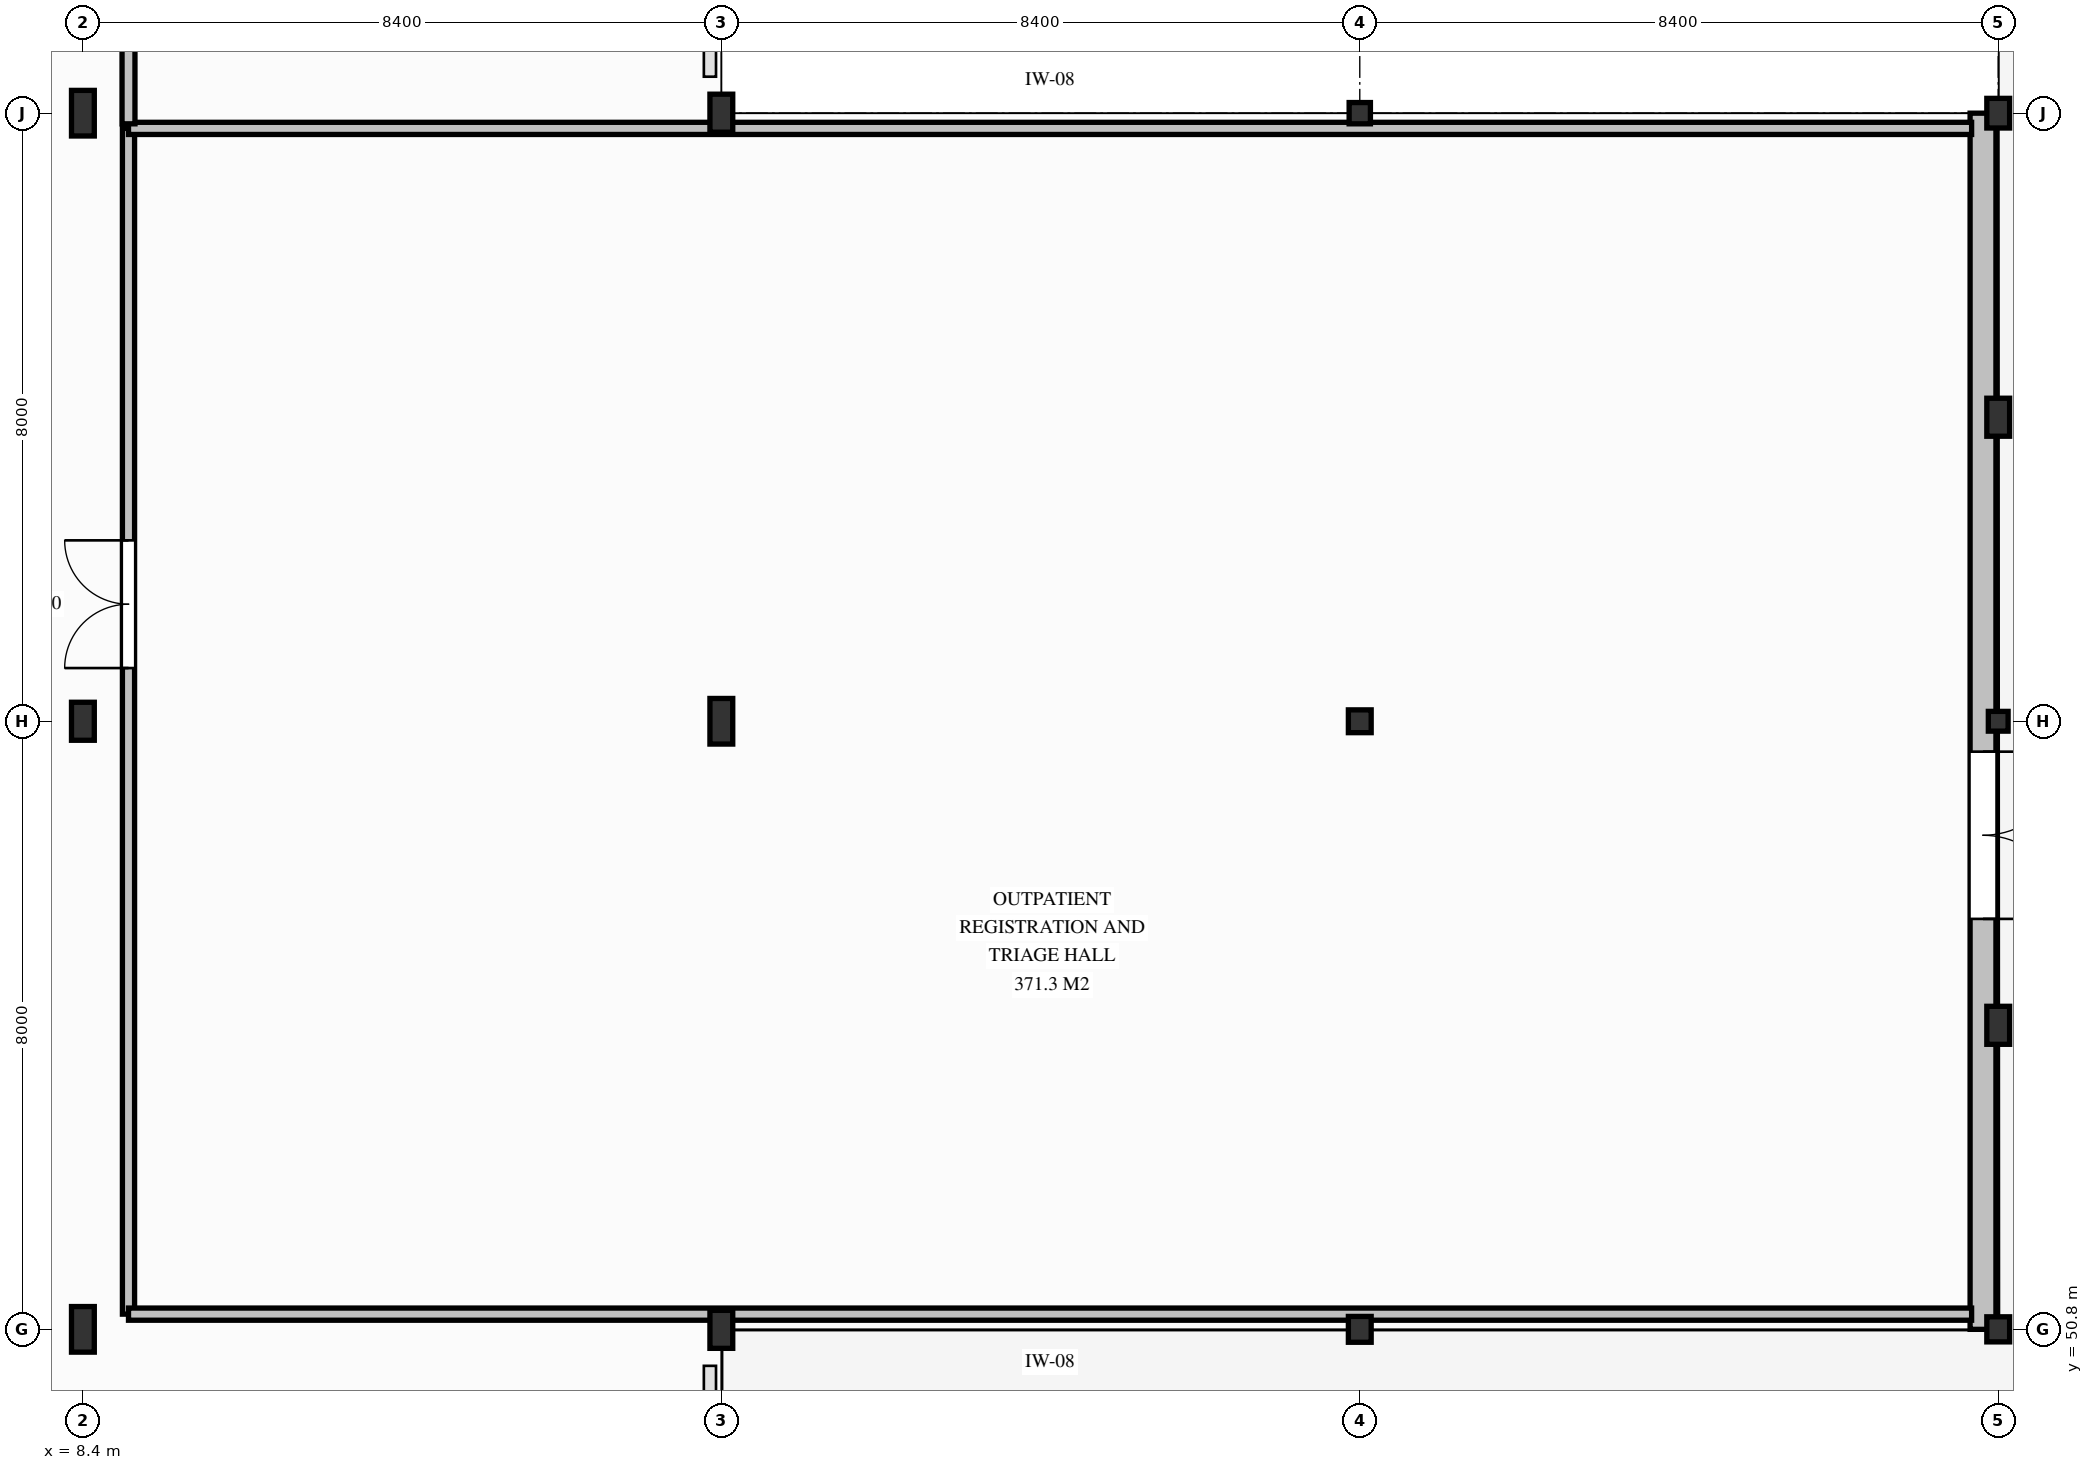
"""IFC4 building model, lengths in metres.
Left out: names, types, materials, properties, quantities, classifications, styles, units other than length and angle.
Written with IfcOpenShell. Run it as: python <this file> out.ifc"""

import sys

from ifc_helpers import new_model, si_unit, direction, frame, frame_2d, origin, origin_2d, place, context, subcontext, project, spatial, rectangle, i_section, extrude, element, fill, save


model = new_model("IFC4")
c1 = context("Model", 3, precision=1e-05, world=origin(), true_north=direction((0.0, 1.0)))
c2 = subcontext(c1, "Body", "Model", "MODEL_VIEW")
j1 = project(units=[si_unit("LENGTHUNIT", "METRE"), si_unit("PLANEANGLEUNIT", "RADIAN")], contexts=[c1])
p1 = place(None, origin())
s1 = spatial("IfcSite", under=j1, at=p1, CompositionType="ELEMENT")
p2 = place(p1, origin())
s2 = spatial("IfcBuilding", under=s1, at=p2, CompositionType="ELEMENT")
p3 = place(p2, origin())
s3 = spatial("IfcBuildingStorey", under=s2, at=p3, CompositionType="ELEMENT", Elevation=0.0)
p4 = place(p3, frame((8.4, 50.8, 0.0), z_axis=(0.0, 0.0, 1.0), x_axis=(1.0, 0.0, 0.0)))
e1 = element("IfcColumn", 1, at=p4, inside=s3, PredefinedType="COLUMN", context=c2, shape_type="SweptSolid", body=[
    extrude(i_section(OverallWidth=0.3, OverallDepth=0.6, WebThickness=0.015, FlangeThickness=0.03, FilletRadius=0.027, at=origin_2d()), origin(), (0.0, 0.0, 1.0), 4.5),
])
p5 = place(p3, frame((8.4, 58.8, 0.0), z_axis=(0.0, 0.0, 1.0), x_axis=(1.0, 0.0, 0.0)))
e2 = element("IfcColumn", 2, at=p5, inside=s3, PredefinedType="COLUMN", context=c2, shape_type="SweptSolid", body=[
    extrude(i_section(OverallWidth=0.3, OverallDepth=0.5, WebThickness=0.014, FlangeThickness=0.028, FilletRadius=0.027, at=origin_2d()), origin(), (0.0, 0.0, 1.0), 4.5),
])
p6 = place(p3, frame((8.4, 66.8, 0.0), z_axis=(0.0, 0.0, 1.0), x_axis=(1.0, 0.0, 0.0)))
e3 = element("IfcColumn", 3, at=p6, inside=s3, PredefinedType="COLUMN", context=c2, shape_type="SweptSolid", body=[
    extrude(i_section(OverallWidth=0.3, OverallDepth=0.6, WebThickness=0.015, FlangeThickness=0.03, FilletRadius=0.027, at=origin_2d()), origin(), (0.0, 0.0, 1.0), 4.5),
])
p7 = place(p3, frame((16.8, 50.8, 0.0), z_axis=(0.0, 0.0, 1.0), x_axis=(1.0, 0.0, 0.0)))
e4 = element("IfcColumn", 4, at=p7, inside=s3, PredefinedType="COLUMN", context=c2, shape_type="SweptSolid", body=[
    extrude(i_section(OverallWidth=0.3, OverallDepth=0.5, WebThickness=0.014, FlangeThickness=0.028, FilletRadius=0.027, at=origin_2d()), origin(), (0.0, 0.0, 1.0), 4.5),
])
p8 = place(p3, frame((16.8, 58.8, 0.0), z_axis=(0.0, 0.0, 1.0), x_axis=(1.0, 0.0, 0.0)))
e5 = element("IfcColumn", 5, at=p8, inside=s3, PredefinedType="COLUMN", context=c2, shape_type="SweptSolid", body=[
    extrude(i_section(OverallWidth=0.3, OverallDepth=0.6, WebThickness=0.015, FlangeThickness=0.03, FilletRadius=0.027, at=origin_2d()), origin(), (0.0, 0.0, 1.0), 4.5),
])
p9 = place(p3, frame((16.8, 66.8, 0.0), z_axis=(0.0, 0.0, 1.0), x_axis=(1.0, 0.0, 0.0)))
e6 = element("IfcColumn", 6, at=p9, inside=s3, PredefinedType="COLUMN", context=c2, shape_type="SweptSolid", body=[
    extrude(i_section(OverallWidth=0.3, OverallDepth=0.5, WebThickness=0.014, FlangeThickness=0.028, FilletRadius=0.027, at=origin_2d()), origin(), (0.0, 0.0, 1.0), 4.5),
])
p10 = place(p3, frame((25.2, 50.8, 0.0), z_axis=(0.0, 0.0, 1.0), x_axis=(1.0, 0.0, 0.0)))
e7 = element("IfcColumn", 7, at=p10, inside=s3, PredefinedType="COLUMN", context=c2, shape_type="SweptSolid", body=[
    extrude(i_section(OverallWidth=0.3, OverallDepth=0.34, WebThickness=0.012, FlangeThickness=0.021, FilletRadius=0.027, at=origin_2d()), origin(), (0.0, 0.0, 1.0), 4.5),
])
p11 = place(p3, frame((25.2, 58.8, 0.0), z_axis=(0.0, 0.0, 1.0), x_axis=(1.0, 0.0, 0.0)))
e8 = element("IfcColumn", 8, at=p11, inside=s3, PredefinedType="COLUMN", context=c2, shape_type="SweptSolid", body=[
    extrude(i_section(OverallWidth=0.3, OverallDepth=0.3, WebThickness=0.011, FlangeThickness=0.019, FilletRadius=0.027, at=origin_2d()), origin(), (0.0, 0.0, 1.0), 4.5),
])
p12 = place(p3, frame((25.2, 66.8, 0.0), z_axis=(0.0, 0.0, 1.0), x_axis=(1.0, 0.0, 0.0)))
e9 = element("IfcColumn", 9, at=p12, inside=s3, PredefinedType="COLUMN", context=c2, shape_type="SweptSolid", body=[
    extrude(i_section(OverallWidth=0.28, OverallDepth=0.28, WebThickness=0.01, FlangeThickness=0.018, FilletRadius=0.024, at=origin_2d()), origin(), (0.0, 0.0, 1.0), 4.5),
])
p13 = place(p3, frame((33.6, 50.8, 0.0), z_axis=(0.0, 0.0, 1.0), x_axis=(1.0, 0.0, 0.0)))
e10 = element("IfcColumn", 10, at=p13, inside=s3, PredefinedType="COLUMN", context=c2, shape_type="SweptSolid", body=[
    extrude(i_section(OverallWidth=0.3, OverallDepth=0.33, WebThickness=0.01, FlangeThickness=0.017, FilletRadius=0.027, at=origin_2d()), origin(), (0.0, 0.0, 1.0), 4.5),
])
p14 = place(p3, frame((33.6, 54.8, 0.0), z_axis=(0.0, 0.0, 1.0), x_axis=(1.0, 0.0, 0.0)))
e11 = element("IfcColumn", 11, at=p14, inside=s3, PredefinedType="COLUMN", context=c2, shape_type="SweptSolid", body=[
    extrude(i_section(OverallWidth=0.3, OverallDepth=0.5, WebThickness=0.014, FlangeThickness=0.028, FilletRadius=0.027, at=origin_2d()), origin(), (0.0, 0.0, 1.0), 4.5),
])
p15 = place(p3, frame((33.6, 58.8, 0.0), z_axis=(0.0, 0.0, 1.0), x_axis=(1.0, 0.0, 0.0)))
e12 = element("IfcColumn", 12, at=p15, inside=s3, PredefinedType="COLUMN", context=c2, shape_type="SweptSolid", body=[
    extrude(i_section(OverallWidth=0.26, OverallDepth=0.26, WebThickness=0.01, FlangeThickness=0.018, FilletRadius=0.024, at=origin_2d()), origin(), (0.0, 0.0, 1.0), 4.5),
])
p16 = place(p3, frame((33.6, 62.8, 0.0), z_axis=(0.0, 0.0, 1.0), x_axis=(1.0, 0.0, 0.0)))
e13 = element("IfcColumn", 13, at=p16, inside=s3, PredefinedType="COLUMN", context=c2, shape_type="SweptSolid", body=[
    extrude(i_section(OverallWidth=0.3, OverallDepth=0.5, WebThickness=0.014, FlangeThickness=0.028, FilletRadius=0.027, at=origin_2d()), origin(), (0.0, 0.0, 1.0), 4.5),
])
p17 = place(p3, frame((33.6, 66.8, 0.0), z_axis=(0.0, 0.0, 1.0), x_axis=(1.0, 0.0, 0.0)))
e14 = element("IfcColumn", 14, at=p17, inside=s3, PredefinedType="COLUMN", context=c2, shape_type="SweptSolid", body=[
    extrude(i_section(OverallWidth=0.3, OverallDepth=0.39, WebThickness=0.011, FlangeThickness=0.019, FilletRadius=0.027, at=origin_2d()), origin(), (0.0, 0.0, 1.0), 4.5),
])
p18 = place(p3, frame((33.4, 66.8, 0.0), z_axis=(0.0, 0.0, 1.0), x_axis=(0.0, -1.0, 0.0)))
e15 = element("IfcWall", 15, at=p18, inside=s3, PredefinedType="SOLIDWALL", context=c2, shape_type="SweptSolid", body=[
    extrude(rectangle(XDim=16.0, YDim=0.34, at=frame_2d((8.0, 0.0))), origin(), (0.0, 0.0, 1.0), 2.828),
])
p19 = place(p18, frame((8.4, 0.0, 0.0)))
e16 = element("IfcOpeningElement", 16, at=p19, cuts=e15, PredefinedType="OPENING", context=c2, shape_type="SweptSolid", body=[
    extrude(rectangle(XDim=2.2, YDim=2.5, at=frame_2d((1.1, 1.25))), frame((0.0, 0.18, 0.0), z_axis=(0.0, -1.0, 0.0), x_axis=(1.0, 0.0, 0.0)), (0.0, 0.0, 1.0), 0.36),
])
p20 = place(p3, frame((9.0, 51.0, 0.0), z_axis=(0.0, 0.0, 1.0), x_axis=(0.0, 1.0, 0.0)))
e17 = element("IfcWall", 17, at=p20, inside=s3, PredefinedType="PARTITIONING", context=c2, shape_type="SweptSolid", body=[
    extrude(rectangle(XDim=15.6, YDim=0.16, at=frame_2d((7.8, 0.0))), origin(), (0.0, 0.0, 1.0), 3.778),
])
p21 = place(p20, frame((8.5, 0.0, 0.0)))
e18 = element("IfcOpeningElement", 18, at=p21, cuts=e17, PredefinedType="OPENING", context=c2, shape_type="SweptSolid", body=[
    extrude(rectangle(XDim=1.68, YDim=2.26, at=frame_2d((0.84, 1.13))), frame((0.0, 0.09, 0.0), z_axis=(0.0, -1.0, 0.0), x_axis=(1.0, 0.0, 0.0)), (0.0, 0.0, 1.0), 0.18),
])
p22 = place(p3, frame((9.0, 66.6, 0.0), z_axis=(0.0, 0.0, 1.0), x_axis=(1.0, 0.0, 0.0)))
e19 = element("IfcWall", 19, at=p22, inside=s3, PredefinedType="PARTITIONING", context=c2, shape_type="SweptSolid", body=[
    extrude(rectangle(XDim=24.25, YDim=0.16, at=frame_2d((12.125, 0.0))), origin(), (0.0, 0.0, 1.0), 3.628),
])
p23 = place(p3, frame((33.25, 51.0, 0.0), z_axis=(0.0, 0.0, 1.0), x_axis=(-1.0, 0.0, 0.0)))
e20 = element("IfcWall", 20, at=p23, inside=s3, PredefinedType="PARTITIONING", context=c2, shape_type="SweptSolid", body=[
    extrude(rectangle(XDim=24.25, YDim=0.16, at=frame_2d((12.125, 0.0))), origin(), (0.0, 0.0, 1.0), 3.678),
])
p24 = place(p3, frame((9.0, 94.6, 0.0), z_axis=(0.0, 0.0, 1.0), x_axis=(0.0, -1.0, 0.0)))
e21 = element("IfcWall", 21, at=p24, inside=s3, PredefinedType="PARTITIONING", context=c2, shape_type="SweptSolid", body=[
    extrude(rectangle(XDim=27.94, YDim=0.17, at=frame_2d((13.97, 0.0))), origin(), (0.0, 0.0, 1.0), 3.788),
])
p25 = place(p24, frame((13.05, 0.0, 0.0)))
e22 = element("IfcOpeningElement", 22, at=p25, cuts=e21, PredefinedType="OPENING", context=c2, shape_type="SweptSolid", body=[
    extrude(rectangle(XDim=1.06, YDim=2.16, at=frame_2d((0.53, 1.08))), frame((0.0, 0.095, 0.0), z_axis=(0.0, -1.0, 0.0), x_axis=(1.0, 0.0, 0.0)), (0.0, 0.0, 1.0), 0.19),
])
p26 = place(p19, origin())
e23 = element("IfcDoor", 23, at=p26, inside=s3, OperationType="DOUBLE_DOOR_SINGLE_SWING", PredefinedType="DOOR", context=c2, shape_type="SweptSolid", body=[
    extrude(rectangle(XDim=2.2, YDim=2.5, at=frame_2d((1.1, 1.25))), frame((0.0, 0.025, 0.0), z_axis=(0.0, -1.0, 0.0), x_axis=(1.0, 0.0, 0.0)), (0.0, 0.0, 1.0), 0.05),
])
fill(e16, e23)
p27 = place(p21, origin())
e24 = element("IfcDoor", 24, at=p27, inside=s3, OperationType="DOUBLE_DOOR_SINGLE_SWING", PredefinedType="DOOR", context=c2, shape_type="SweptSolid", body=[
    extrude(rectangle(XDim=1.68, YDim=2.26, at=frame_2d((0.84, 1.13))), frame((0.0, 0.025, 0.0), z_axis=(0.0, -1.0, 0.0), x_axis=(1.0, 0.0, 0.0)), (0.0, 0.0, 1.0), 0.05),
])
fill(e18, e24)
save(model, sys.argv[1])
